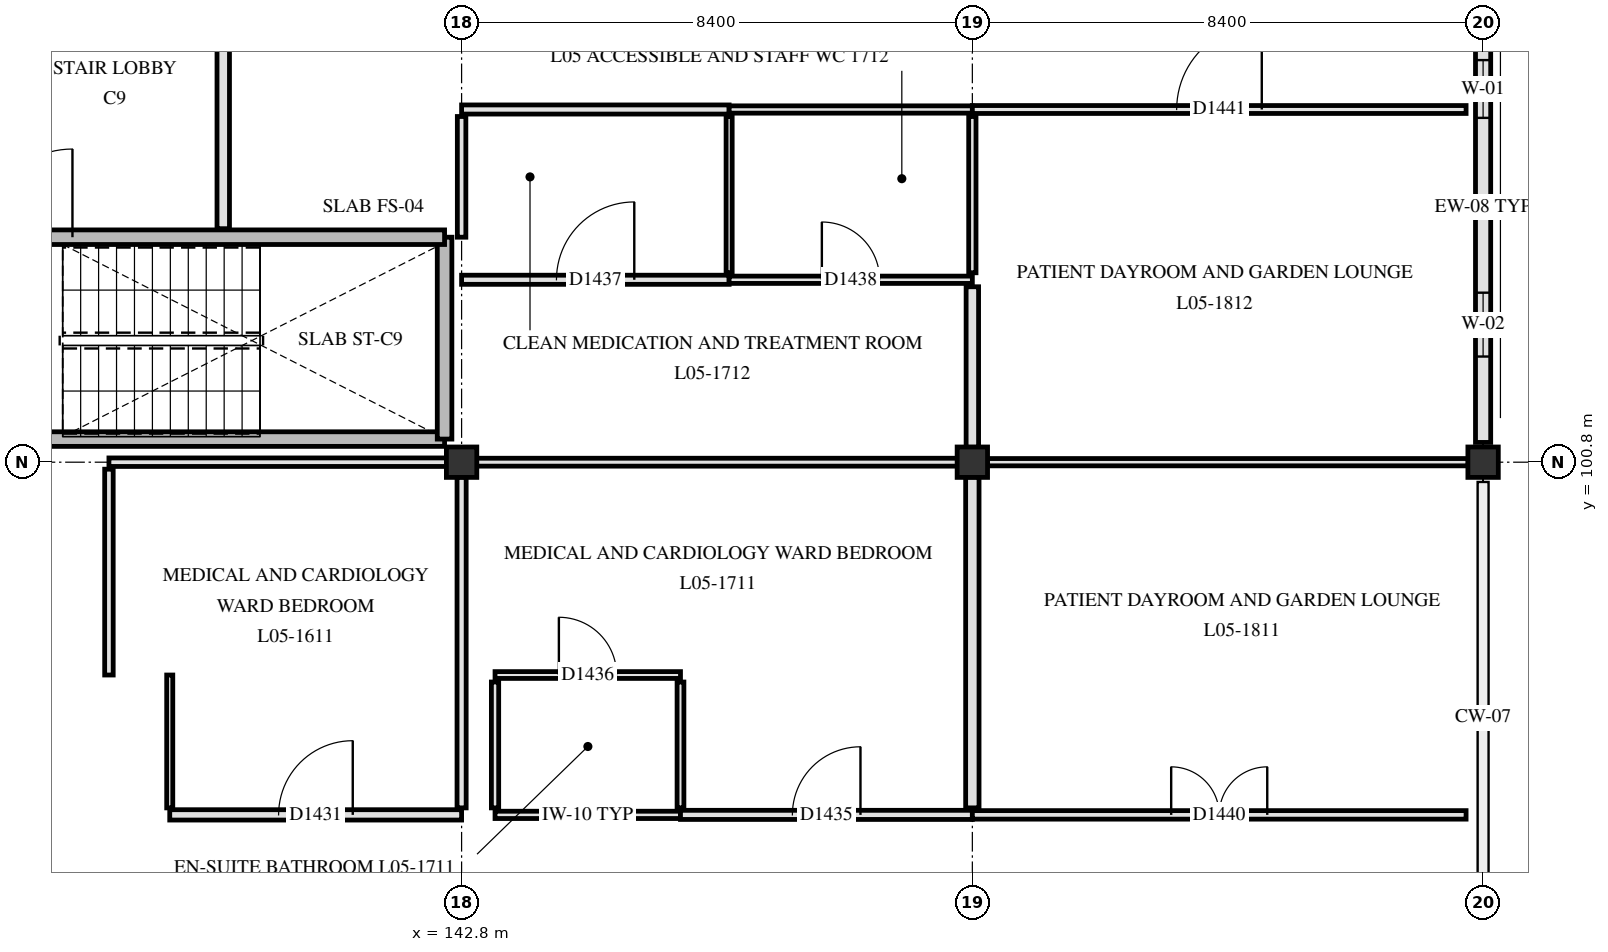
"""IFC4 building model, lengths in metres.
Left out: names, types, materials, properties, quantities, classifications, styles, units other than length and angle.
Written with IfcOpenShell. Run it as: python <this file> out.ifc"""

import sys

from ifc_helpers import new_model, si_unit, direction, frame, frame_2d, origin, origin_2d, place, context, subcontext, project, spatial, rectangle, extrude, element, fill, save


model = new_model("IFC4")
c1 = context("Model", 3, precision=1e-05, world=origin(), true_north=direction((0.0, 1.0)))
c2 = subcontext(c1, "Body", "Model", "MODEL_VIEW")
j1 = project(units=[si_unit("LENGTHUNIT", "METRE"), si_unit("PLANEANGLEUNIT", "RADIAN")], contexts=[c1])
p1 = place(None, origin())
s1 = spatial("IfcSite", under=j1, at=p1, CompositionType="ELEMENT")
p2 = place(p1, origin())
s2 = spatial("IfcBuilding", under=s1, at=p2, CompositionType="ELEMENT")
p3 = place(p2, frame((0.0, 0.0, 22.5)))
s3 = spatial("IfcBuildingStorey", under=s2, at=p3, CompositionType="ELEMENT", Elevation=22.5)
for number, where, z_axis, x_axis in (
    (1, (142.8, 100.8, 0.0), (0.0, 0.0, 1.0), (1.0, 0.0, 0.0)),
    (2, (151.2, 100.8, 0.0), (0.0, 0.0, 1.0), (1.0, 0.0, 0.0)),
    (3, (159.6, 100.8, 0.0), (0.0, 0.0, 1.0), (1.0, 0.0, 0.0)),
):
    element("IfcColumn", number, at=place(p3, frame(where, z_axis=z_axis, x_axis=x_axis)), inside=s3, PredefinedType="COLUMN", context=c2, shape_type="SweptSolid", body=[
        extrude(rectangle(XDim=0.5, YDim=0.5, at=origin_2d()), origin(), (0.0, 0.0, 1.0), 3.9),
    ])
p4 = place(p3, frame((159.6, 108.875, 0.0), z_axis=(0.0, 0.0, 1.0), x_axis=(0.0, -1.0, 0.0)))
e4 = element("IfcWall", 4, at=p4, inside=s3, PredefinedType="SOLIDWALL", context=c2, shape_type="SweptSolid", body=[
    extrude(rectangle(XDim=7.75, YDim=0.25, at=frame_2d((3.875, 0.0))), origin(), (0.0, 0.0, 1.0), 3.37),
])
p5 = place(p4, frame((1.462, 0.0, 0.85)))
e5 = element("IfcOpeningElement", 5, at=p5, cuts=e4, PredefinedType="OPENING", context=c2, shape_type="SweptSolid", body=[
    extrude(rectangle(XDim=0.95, YDim=1.3, at=frame_2d((0.475, 0.65))), frame((0.0, 0.135, 0.0), z_axis=(0.0, -1.0, 0.0), x_axis=(1.0, 0.0, 0.0)), (0.0, 0.0, 1.0), 0.27),
])
p6 = place(p4, frame((5.288, 0.0, 0.85)))
e6 = element("IfcOpeningElement", 6, at=p6, cuts=e4, PredefinedType="OPENING", context=c2, shape_type="SweptSolid", body=[
    extrude(rectangle(XDim=1.05, YDim=1.3, at=frame_2d((0.525, 0.65))), frame((0.0, 0.135, 0.0), z_axis=(0.0, -1.0, 0.0), x_axis=(1.0, 0.0, 0.0)), (0.0, 0.0, 1.0), 0.27),
])
p7 = place(p3, frame((134.7, 101.18, 0.0), z_axis=(0.0, 0.0, 1.0), x_axis=(1.0, 0.0, 0.0)))
e7 = element("IfcWall", 7, at=p7, inside=s3, PredefinedType="SHEAR", context=c2, shape_type="SweptSolid", body=[
    extrude(rectangle(XDim=7.82, YDim=0.24, at=frame_2d((3.91, 0.0))), origin(), (0.0, 0.0, 1.0), 3.62),
])
p8 = place(p3, frame((142.52, 101.18, 0.0), z_axis=(0.0, 0.0, 1.0), x_axis=(0.0, 1.0, 0.0)))
e8 = element("IfcWall", 8, at=p8, inside=s3, PredefinedType="SHEAR", context=c2, shape_type="SweptSolid", body=[
    extrude(rectangle(XDim=3.32, YDim=0.24, at=frame_2d((1.66, 0.0))), origin(), (0.0, 0.0, 1.0), 3.62),
])
p9 = place(p3, frame((134.7, 104.5, 0.0), z_axis=(0.0, 0.0, 1.0), x_axis=(1.0, 0.0, 0.0)))
e9 = element("IfcWall", 9, at=p9, inside=s3, PredefinedType="SHEAR", context=c2, shape_type="SweptSolid", body=[
    extrude(rectangle(XDim=7.82, YDim=0.24, at=frame_2d((3.91, 0.0))), origin(), (0.0, 0.0, 1.0), 3.62),
])
p10 = place(p9, frame((0.25, 0.0, 0.0)))
e10 = element("IfcOpeningElement", 10, at=p10, cuts=e9, PredefinedType="OPENING", context=c2, shape_type="SweptSolid", body=[
    extrude(rectangle(XDim=1.45, YDim=2.2, at=frame_2d((0.725, 1.1))), frame((0.0, 0.13, 0.0), z_axis=(0.0, -1.0, 0.0), x_axis=(1.0, 0.0, 0.0)), (0.0, 0.0, 1.0), 0.26),
])
p11 = place(p3, frame((138.88, 104.64, 0.0), z_axis=(0.0, 0.0, 1.0), x_axis=(0.0, 1.0, 0.0)))
e11 = element("IfcWall", 11, at=p11, inside=s3, PredefinedType="PARTITIONING", context=c2, shape_type="SweptSolid", body=[
    extrude(rectangle(XDim=4.12, YDim=0.205, at=frame_2d((2.06, 0.0))), origin(), (0.0, 0.0, 1.0), 3.61),
])
p12 = place(p3, frame((138.0, 95.0, 0.0), z_axis=(0.0, 0.0, 1.0), x_axis=(1.0, 0.0, 0.0)))
e12 = element("IfcWall", 12, at=p12, inside=s3, PredefinedType="PARTITIONING", context=c2, shape_type="SweptSolid", body=[
    extrude(rectangle(XDim=4.8, YDim=0.17, at=frame_2d((2.4, 0.0))), origin(), (0.0, 0.0, 1.0), 3.3),
])
p13 = place(p12, frame((1.79, 0.0, 0.0)))
e13 = element("IfcOpeningElement", 13, at=p13, cuts=e12, PredefinedType="OPENING", context=c2, shape_type="SweptSolid", body=[
    extrude(rectangle(XDim=1.22, YDim=2.18, at=frame_2d((0.61, 1.09))), frame((0.0, 0.095, 0.0), z_axis=(0.0, -1.0, 0.0), x_axis=(1.0, 0.0, 0.0)), (0.0, 0.0, 1.0), 0.19),
])
p14 = place(p3, frame((143.35, 95.0, 0.0), z_axis=(0.0, 0.0, 1.0), x_axis=(1.0, 0.0, 0.0)))
e14 = element("IfcWall", 14, at=p14, inside=s3, PredefinedType="PARTITIONING", context=c2, shape_type="SweptSolid", body=[
    extrude(rectangle(XDim=3.05, YDim=0.12, at=frame_2d((1.525, 0.0))), origin(), (0.0, 0.0, 1.0), 3.61),
])
p15 = place(p3, frame((146.4, 95.0, 0.0), z_axis=(0.0, 0.0, 1.0), x_axis=(1.0, 0.0, 0.0)))
e15 = element("IfcWall", 15, at=p15, inside=s3, PredefinedType="PARTITIONING", context=c2, shape_type="SweptSolid", body=[
    extrude(rectangle(XDim=4.8, YDim=0.15, at=frame_2d((2.4, 0.0))), origin(), (0.0, 0.0, 1.0), 3.29),
])
p16 = place(p15, frame((1.84, 0.0, 0.0)))
e16 = element("IfcOpeningElement", 16, at=p16, cuts=e15, PredefinedType="OPENING", context=c2, shape_type="SweptSolid", body=[
    extrude(rectangle(XDim=1.12, YDim=2.18, at=frame_2d((0.56, 1.09))), frame((0.0, 0.085, 0.0), z_axis=(0.0, -1.0, 0.0), x_axis=(1.0, 0.0, 0.0)), (0.0, 0.0, 1.0), 0.17),
])
p17 = place(p3, frame((151.2, 95.0, 0.0), z_axis=(0.0, 0.0, 1.0), x_axis=(1.0, 0.0, 0.0)))
e17 = element("IfcWall", 17, at=p17, inside=s3, PredefinedType="PARTITIONING", context=c2, shape_type="SweptSolid", body=[
    extrude(rectangle(XDim=8.12, YDim=0.14, at=frame_2d((4.06, 0.0))), origin(), (0.0, 0.0, 1.0), 3.29),
])
p18 = place(p17, frame((3.27, 0.0, 0.0)))
e18 = element("IfcOpeningElement", 18, at=p18, cuts=e17, PredefinedType="OPENING", context=c2, shape_type="SweptSolid", body=[
    extrude(rectangle(XDim=1.58, YDim=2.22, at=frame_2d((0.79, 1.11))), frame((0.0, 0.08, 0.0), z_axis=(0.0, -1.0, 0.0), x_axis=(1.0, 0.0, 0.0)), (0.0, 0.0, 1.0), 0.16),
])
p19 = place(p3, frame((143.35, 97.3, 0.0), z_axis=(0.0, 0.0, 1.0), x_axis=(1.0, 0.0, 0.0)))
e19 = element("IfcWall", 19, at=p19, inside=s3, PredefinedType="PARTITIONING", context=c2, shape_type="SweptSolid", body=[
    extrude(rectangle(XDim=3.05, YDim=0.112, at=frame_2d((1.525, 0.0))), origin(), (0.0, 0.0, 1.0), 3.61),
])
p20 = place(p19, frame((1.05, 0.0, 0.0)))
e20 = element("IfcOpeningElement", 20, at=p20, cuts=e19, PredefinedType="OPENING", context=c2, shape_type="SweptSolid", body=[
    extrude(rectangle(XDim=0.95, YDim=2.1, at=frame_2d((0.475, 1.05))), frame((0.0, 0.066, 0.0), z_axis=(0.0, -1.0, 0.0), x_axis=(1.0, 0.0, 0.0)), (0.0, 0.0, 1.0), 0.132),
])
p21 = place(p3, frame((137.0, 100.8, 0.0), z_axis=(0.0, 0.0, 1.0), x_axis=(1.0, 0.0, 0.0)))
e21 = element("IfcWall", 21, at=p21, inside=s3, PredefinedType="PARTITIONING", context=c2, shape_type="SweptSolid", body=[
    extrude(rectangle(XDim=5.555, YDim=0.14, at=frame_2d((2.777, 0.0))), origin(), (0.0, 0.0, 1.0), 3.16),
])
p22 = place(p3, frame((143.045, 100.8, 0.0), z_axis=(0.0, 0.0, 1.0), x_axis=(1.0, 0.0, 0.0)))
e22 = element("IfcWall", 22, at=p22, inside=s3, PredefinedType="PARTITIONING", context=c2, shape_type="SweptSolid", body=[
    extrude(rectangle(XDim=7.91, YDim=0.13, at=frame_2d((3.955, 0.0))), origin(), (0.0, 0.0, 1.0), 3.16),
])
p23 = place(p3, frame((151.445, 100.8, 0.0), z_axis=(0.0, 0.0, 1.0), x_axis=(1.0, 0.0, 0.0)))
e23 = element("IfcWall", 23, at=p23, inside=s3, PredefinedType="PARTITIONING", context=c2, shape_type="SweptSolid", body=[
    extrude(rectangle(XDim=7.91, YDim=0.12, at=frame_2d((3.955, 0.0))), origin(), (0.0, 0.0, 1.0), 3.15),
])
p24 = place(p3, frame((142.8, 103.8, 0.0), z_axis=(0.0, 0.0, 1.0), x_axis=(1.0, 0.0, 0.0)))
e24 = element("IfcWall", 24, at=p24, inside=s3, PredefinedType="PARTITIONING", context=c2, shape_type="SweptSolid", body=[
    extrude(rectangle(XDim=4.4, YDim=0.15, at=frame_2d((2.2, 0.0))), origin(), (0.0, 0.0, 1.0), 3.3),
])
p25 = place(p24, frame((1.56, 0.0, 0.0)))
e25 = element("IfcOpeningElement", 25, at=p25, cuts=e24, PredefinedType="OPENING", context=c2, shape_type="SweptSolid", body=[
    extrude(rectangle(XDim=1.28, YDim=2.18, at=frame_2d((0.64, 1.09))), frame((0.0, 0.085, 0.0), z_axis=(0.0, -1.0, 0.0), x_axis=(1.0, 0.0, 0.0)), (0.0, 0.0, 1.0), 0.17),
])
p26 = place(p3, frame((147.2, 103.8, 0.0), z_axis=(0.0, 0.0, 1.0), x_axis=(1.0, 0.0, 0.0)))
e26 = element("IfcWall", 26, at=p26, inside=s3, PredefinedType="PARTITIONING", context=c2, shape_type="SweptSolid", body=[
    extrude(rectangle(XDim=4.0, YDim=0.12, at=frame_2d((2.0, 0.0))), origin(), (0.0, 0.0, 1.0), 3.29),
])
p27 = place(p26, frame((1.525, 0.0, 0.0)))
e27 = element("IfcOpeningElement", 27, at=p27, cuts=e26, PredefinedType="OPENING", context=c2, shape_type="SweptSolid", body=[
    extrude(rectangle(XDim=0.95, YDim=2.1, at=frame_2d((0.475, 1.05))), frame((0.0, 0.07, 0.0), z_axis=(0.0, -1.0, 0.0), x_axis=(1.0, 0.0, 0.0)), (0.0, 0.0, 1.0), 0.14),
])
p28 = place(p3, frame((142.8, 106.6, 0.0), z_axis=(0.0, 0.0, 1.0), x_axis=(1.0, 0.0, 0.0)))
e28 = element("IfcWall", 28, at=p28, inside=s3, PredefinedType="PARTITIONING", context=c2, shape_type="SweptSolid", body=[
    extrude(rectangle(XDim=4.4, YDim=0.15, at=frame_2d((2.2, 0.0))), origin(), (0.0, 0.0, 1.0), 3.3),
])
p29 = place(p3, frame((147.2, 106.6, 0.0), z_axis=(0.0, 0.0, 1.0), x_axis=(1.0, 0.0, 0.0)))
e29 = element("IfcWall", 29, at=p29, inside=s3, PredefinedType="PARTITIONING", context=c2, shape_type="SweptSolid", body=[
    extrude(rectangle(XDim=4.0, YDim=0.12, at=frame_2d((2.0, 0.0))), origin(), (0.0, 0.0, 1.0), 3.29),
])
p30 = place(p3, frame((151.2, 106.6, 0.0), z_axis=(0.0, 0.0, 1.0), x_axis=(1.0, 0.0, 0.0)))
e30 = element("IfcWall", 30, at=p30, inside=s3, PredefinedType="PARTITIONING", context=c2, shape_type="SweptSolid", body=[
    extrude(rectangle(XDim=8.12, YDim=0.13, at=frame_2d((4.06, 0.0))), origin(), (0.0, 0.0, 1.0), 3.29),
])
p31 = place(p30, frame((3.36, 0.0, 0.0)))
e31 = element("IfcOpeningElement", 31, at=p31, cuts=e30, PredefinedType="OPENING", context=c2, shape_type="SweptSolid", body=[
    extrude(rectangle(XDim=1.4, YDim=2.2, at=frame_2d((0.7, 1.1))), frame((0.0, 0.075, 0.0), z_axis=(0.0, -1.0, 0.0), x_axis=(1.0, 0.0, 0.0)), (0.0, 0.0, 1.0), 0.15),
])
p32 = place(p3, frame((137.0, 97.3, 0.0), z_axis=(0.0, 0.0, 1.0), x_axis=(0.0, 1.0, 0.0)))
e32 = element("IfcWall", 32, at=p32, inside=s3, PredefinedType="PARTITIONING", context=c2, shape_type="SweptSolid", body=[
    extrude(rectangle(XDim=3.385, YDim=0.14, at=frame_2d((1.692, 0.0))), origin(), (0.0, 0.0, 1.0), 3.34),
])
p33 = place(p3, frame((138.0, 95.115, 0.0), z_axis=(0.0, 0.0, 1.0), x_axis=(0.0, 1.0, 0.0)))
e33 = element("IfcWall", 33, at=p33, inside=s3, PredefinedType="PARTITIONING", context=c2, shape_type="SweptSolid", body=[
    extrude(rectangle(XDim=2.185, YDim=0.1, at=frame_2d((1.093, 0.0))), origin(), (0.0, 0.0, 1.0), 3.34),
])
p34 = place(p3, frame((142.8, 95.115, 0.0), z_axis=(0.0, 0.0, 1.0), x_axis=(0.0, 1.0, 0.0)))
e34 = element("IfcWall", 34, at=p34, inside=s3, PredefinedType="PARTITIONING", context=c2, shape_type="SweptSolid", body=[
    extrude(rectangle(XDim=5.44, YDim=0.15, at=frame_2d((2.72, 0.0))), origin(), (0.0, 0.0, 1.0), 3.3),
])
p35 = place(p3, frame((142.8, 104.5, 0.0), z_axis=(0.0, 0.0, 1.0), x_axis=(0.0, 1.0, 0.0)))
e35 = element("IfcWall", 35, at=p35, inside=s3, PredefinedType="PARTITIONING", context=c2, shape_type="SweptSolid", body=[
    extrude(rectangle(XDim=1.985, YDim=0.14, at=frame_2d((0.993, 0.0))), origin(), (0.0, 0.0, 1.0), 3.3),
])
p36 = place(p3, frame((143.35, 95.115, 0.0), z_axis=(0.0, 0.0, 1.0), x_axis=(0.0, 1.0, 0.0)))
e36 = element("IfcWall", 36, at=p36, inside=s3, PredefinedType="PARTITIONING", context=c2, shape_type="SweptSolid", body=[
    extrude(rectangle(XDim=2.07, YDim=0.12, at=frame_2d((1.035, 0.0))), origin(), (0.0, 0.0, 1.0), 3.34),
])
p37 = place(p3, frame((146.4, 95.115, 0.0), z_axis=(0.0, 0.0, 1.0), x_axis=(0.0, 1.0, 0.0)))
e37 = element("IfcWall", 37, at=p37, inside=s3, PredefinedType="PARTITIONING", context=c2, shape_type="SweptSolid", body=[
    extrude(rectangle(XDim=2.07, YDim=0.112, at=frame_2d((1.035, 0.0))), origin(), (0.0, 0.0, 1.0), 3.34),
])
p38 = place(p3, frame((147.2, 103.915, 0.0), z_axis=(0.0, 0.0, 1.0), x_axis=(0.0, 1.0, 0.0)))
e38 = element("IfcWall", 38, at=p38, inside=s3, PredefinedType="PARTITIONING", context=c2, shape_type="SweptSolid", body=[
    extrude(rectangle(XDim=2.57, YDim=0.1, at=frame_2d((1.285, 0.0))), origin(), (0.0, 0.0, 1.0), 3.34),
])
p39 = place(p3, frame((151.2, 95.115, 0.0), z_axis=(0.0, 0.0, 1.0), x_axis=(0.0, 1.0, 0.0)))
e39 = element("IfcWall", 39, at=p39, inside=s3, PredefinedType="PARTITIONING", context=c2, shape_type="SweptSolid", body=[
    extrude(rectangle(XDim=5.44, YDim=0.22, at=frame_2d((2.72, 0.0))), origin(), (0.0, 0.0, 1.0), 3.29),
])
p40 = place(p3, frame((151.2, 101.045, 0.0), z_axis=(0.0, 0.0, 1.0), x_axis=(0.0, 1.0, 0.0)))
e40 = element("IfcWall", 40, at=p40, inside=s3, PredefinedType="PARTITIONING", context=c2, shape_type="SweptSolid", body=[
    extrude(rectangle(XDim=2.64, YDim=0.205, at=frame_2d((1.32, 0.0))), origin(), (0.0, 0.0, 1.0), 3.29),
])
p41 = place(p3, frame((151.2, 103.915, 0.0), z_axis=(0.0, 0.0, 1.0), x_axis=(0.0, 1.0, 0.0)))
e41 = element("IfcWall", 41, at=p41, inside=s3, PredefinedType="PARTITIONING", context=c2, shape_type="SweptSolid", body=[
    extrude(rectangle(XDim=2.57, YDim=0.12, at=frame_2d((1.285, 0.0))), origin(), (0.0, 0.0, 1.0), 3.29),
])
p42 = place(p5, origin())
e42 = element("IfcWindow", 42, at=p42, inside=s3, PartitioningType="SINGLE_PANEL", PredefinedType="WINDOW", context=c2, shape_type="SweptSolid", body=[
    extrude(rectangle(XDim=0.95, YDim=1.3, at=frame_2d((0.475, 0.65))), frame((0.0, 0.03, 0.0), z_axis=(0.0, -1.0, 0.0), x_axis=(1.0, 0.0, 0.0)), (0.0, 0.0, 1.0), 0.06),
])
fill(e5, e42)
p43 = place(p6, origin())
e43 = element("IfcWindow", 43, at=p43, inside=s3, PartitioningType="SINGLE_PANEL", PredefinedType="WINDOW", context=c2, shape_type="SweptSolid", body=[
    extrude(rectangle(XDim=1.05, YDim=1.3, at=frame_2d((0.525, 0.65))), frame((0.0, 0.03, 0.0), z_axis=(0.0, -1.0, 0.0), x_axis=(1.0, 0.0, 0.0)), (0.0, 0.0, 1.0), 0.06),
])
fill(e6, e43)
p44 = place(p10, origin())
e44 = element("IfcDoor", 44, at=p44, inside=s3, OperationType="SINGLE_SWING_RIGHT", PredefinedType="DOOR", context=c2, shape_type="SweptSolid", body=[
    extrude(rectangle(XDim=1.45, YDim=2.2, at=frame_2d((0.725, 1.1))), frame((0.0, 0.025, 0.0), z_axis=(0.0, -1.0, 0.0), x_axis=(1.0, 0.0, 0.0)), (0.0, 0.0, 1.0), 0.05),
])
fill(e10, e44)
p45 = place(p13, origin())
e45 = element("IfcDoor", 45, at=p45, inside=s3, OperationType="SINGLE_SWING_RIGHT", PredefinedType="DOOR", context=c2, shape_type="SweptSolid", body=[
    extrude(rectangle(XDim=1.22, YDim=2.18, at=frame_2d((0.61, 1.09))), frame((0.0, 0.025, 0.0), z_axis=(0.0, -1.0, 0.0), x_axis=(1.0, 0.0, 0.0)), (0.0, 0.0, 1.0), 0.05),
])
fill(e13, e45)
p46 = place(p16, origin())
e46 = element("IfcDoor", 46, at=p46, inside=s3, OperationType="SINGLE_SWING_RIGHT", PredefinedType="DOOR", context=c2, shape_type="SweptSolid", body=[
    extrude(rectangle(XDim=1.12, YDim=2.18, at=frame_2d((0.56, 1.09))), frame((0.0, 0.025, 0.0), z_axis=(0.0, -1.0, 0.0), x_axis=(1.0, 0.0, 0.0)), (0.0, 0.0, 1.0), 0.05),
])
fill(e16, e46)
p47 = place(p20, origin())
e47 = element("IfcDoor", 47, at=p47, inside=s3, OperationType="SINGLE_SWING_LEFT", PredefinedType="DOOR", context=c2, shape_type="SweptSolid", body=[
    extrude(rectangle(XDim=0.95, YDim=2.1, at=frame_2d((0.475, 1.05))), frame((0.0, 0.025, 0.0), z_axis=(0.0, -1.0, 0.0), x_axis=(1.0, 0.0, 0.0)), (0.0, 0.0, 1.0), 0.05),
])
fill(e20, e47)
p48 = place(p25, origin())
e48 = element("IfcDoor", 48, at=p48, inside=s3, OperationType="SINGLE_SWING_RIGHT", PredefinedType="DOOR", context=c2, shape_type="SweptSolid", body=[
    extrude(rectangle(XDim=1.28, YDim=2.18, at=frame_2d((0.64, 1.09))), frame((0.0, 0.025, 0.0), z_axis=(0.0, -1.0, 0.0), x_axis=(1.0, 0.0, 0.0)), (0.0, 0.0, 1.0), 0.05),
])
fill(e25, e48)
p49 = place(p27, origin())
e49 = element("IfcDoor", 49, at=p49, inside=s3, OperationType="SINGLE_SWING_LEFT", PredefinedType="DOOR", context=c2, shape_type="SweptSolid", body=[
    extrude(rectangle(XDim=0.95, YDim=2.1, at=frame_2d((0.475, 1.05))), frame((0.0, 0.025, 0.0), z_axis=(0.0, -1.0, 0.0), x_axis=(1.0, 0.0, 0.0)), (0.0, 0.0, 1.0), 0.05),
])
fill(e27, e49)
p50 = place(p18, origin())
e50 = element("IfcDoor", 50, at=p50, inside=s3, OperationType="DOUBLE_SWING_LEFT", PredefinedType="DOOR", context=c2, shape_type="SweptSolid", body=[
    extrude(rectangle(XDim=1.58, YDim=2.22, at=frame_2d((0.79, 1.11))), frame((0.0, 0.025, 0.0), z_axis=(0.0, -1.0, 0.0), x_axis=(1.0, 0.0, 0.0)), (0.0, 0.0, 1.0), 0.05),
])
fill(e18, e50)
p51 = place(p31, origin())
e51 = element("IfcDoor", 51, at=p51, inside=s3, OperationType="SINGLE_SWING_RIGHT", PredefinedType="DOOR", context=c2, shape_type="SweptSolid", body=[
    extrude(rectangle(XDim=1.4, YDim=2.2, at=frame_2d((0.7, 1.1))), frame((0.0, 0.025, 0.0), z_axis=(0.0, -1.0, 0.0), x_axis=(1.0, 0.0, 0.0)), (0.0, 0.0, 1.0), 0.05),
])
fill(e31, e51)
save(model, sys.argv[1])
